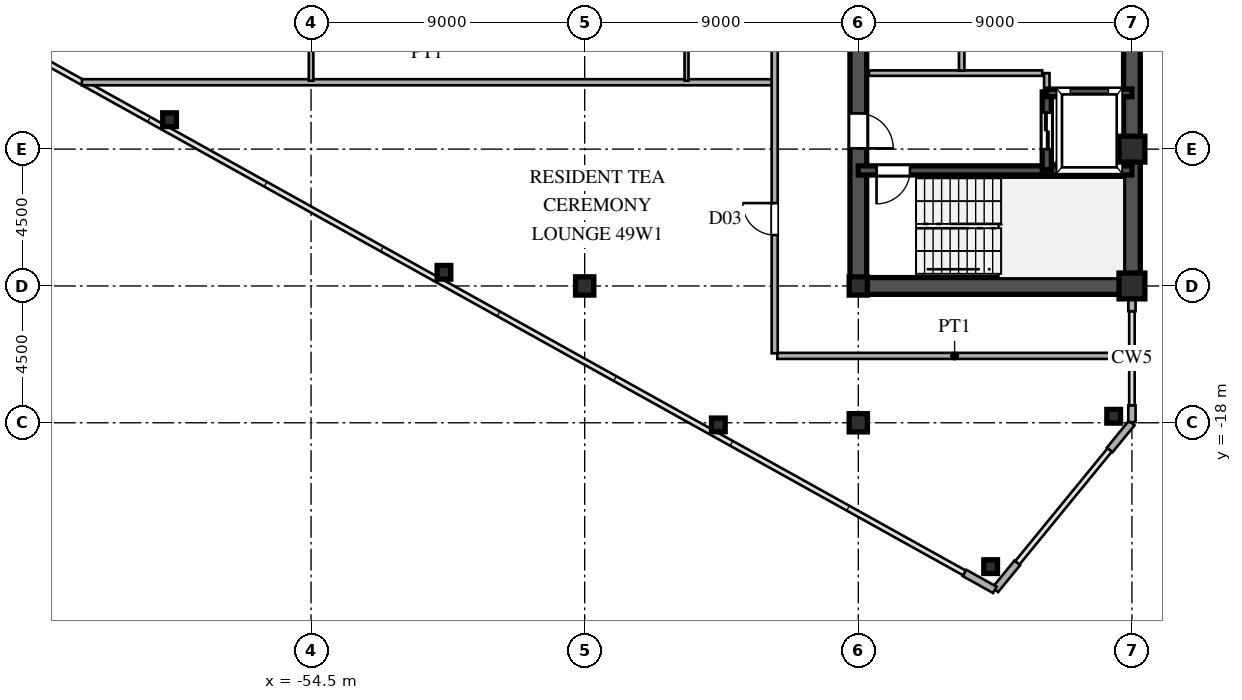
"""IFC4 building model, lengths in metres.
Left out: names, types, materials, properties, quantities, classifications, styles, units other than length and angle.
Written with IfcOpenShell. Run it as: python <this file> out.ifc"""

import sys

from ifc_helpers import new_model, si_unit, direction, frame, frame_2d, origin, origin_2d, place, context, subcontext, project, spatial, rectangle, hollow_rectangle, i_section, extrude, source, transform, mapped, element, fill, save


model = new_model("IFC4")
c1 = context("Model", 3, precision=1e-05, world=origin(), true_north=direction((0.0, 1.0)))
c2 = subcontext(c1, "Body", "Model", "MODEL_VIEW")
j1 = project(units=[si_unit("LENGTHUNIT", "METRE"), si_unit("PLANEANGLEUNIT", "RADIAN")], contexts=[c1])
p1 = place(None, origin())
s1 = spatial("IfcSite", under=j1, at=p1, CompositionType="ELEMENT")
p2 = place(p1, origin())
s2 = spatial("IfcBuilding", under=s1, at=p2, CompositionType="ELEMENT")
p3 = place(p2, frame((0.0, 0.0, 185.1)))
s3 = spatial("IfcBuildingStorey", under=s2, at=p3, CompositionType="ELEMENT", Elevation=185.1)
m1 = source(origin(), c2, "Body", "SweptSolid", [
    extrude(hollow_rectangle(XDim=0.85, YDim=0.85, WallThickness=0.036, at=origin_2d()), origin(), (0.0, 0.0, 1.0), 3.6),
])
for number, where, z_axis, x_axis in (
    (1, (-27.5, -13.5, 0.0), (0.0, 0.0, 1.0), (1.0, 0.0, 0.0)),
    (2, (-27.5, -9.0, 0.0), (0.0, 0.0, 1.0), (1.0, 0.0, 0.0)),
):
    element("IfcColumn", number, at=place(p3, frame(where, z_axis=z_axis, x_axis=x_axis)), inside=s3, PredefinedType="COLUMN", context=c2, shape_type="MappedRepresentation", body=[
        mapped(m1, transform((0.0, 0.0, 0.0), scale=1.0)),
    ])
m2 = source(origin(), c2, "Body", "SweptSolid", [
    extrude(i_section(OverallWidth=0.6, OverallDepth=0.6, WebThickness=0.025, FlangeThickness=0.04, at=origin_2d()), origin(), (0.0, 0.0, 1.0), 3.6),
])
for number, where, z_axis, x_axis in (
    (3, (-36.5, -18.0, 0.0), (0.0, 0.0, 1.0), (1.0, 0.0, 0.0)),
    (4, (-36.5, -13.5, 0.0), (0.0, 0.0, 1.0), (1.0, 0.0, 0.0)),
    (5, (-45.5, -13.5, 0.0), (0.0, 0.0, 1.0), (1.0, 0.0, 0.0)),
):
    element("IfcColumn", number, at=place(p3, frame(where, z_axis=z_axis, x_axis=x_axis)), inside=s3, PredefinedType="COLUMN", context=c2, shape_type="MappedRepresentation", body=[
        mapped(m2, transform((0.0, 0.0, 0.0), scale=1.0)),
    ])
m3 = source(origin(), c2, "Body", "SweptSolid", [
    extrude(hollow_rectangle(XDim=0.45, YDim=0.45, WallThickness=0.018, at=origin_2d()), origin(), (0.0, 0.0, 1.0), 3.6),
])
for number, where, z_axis, x_axis in (
    (6, (-28.1, -17.786, 0.0), (0.0, 0.0, 1.0), (1.0, 0.0, 0.0)),
    (7, (-32.147, -22.732, 0.0), (0.0, 0.0, 1.0), (1.0, 0.0, 0.0)),
    (8, (-41.104, -18.071, 0.0), (0.0, 0.0, 1.0), (1.0, 0.0, 0.0)),
    (9, (-50.129, -13.051, 0.0), (0.0, 0.0, 1.0), (1.0, 0.0, 0.0)),
    (10, (-59.155, -8.031, 0.0), (0.0, 0.0, 1.0), (1.0, 0.0, 0.0)),
):
    element("IfcColumn", number, at=place(p3, frame(where, z_axis=z_axis, x_axis=x_axis)), inside=s3, PredefinedType="COLUMN", context=c2, shape_type="MappedRepresentation", body=[
        mapped(m3, transform((0.0, 0.0, 0.0), scale=1.0)),
    ])
p4 = place(p3, frame((-27.5, -17.98, 0.0), z_axis=(0.0, 0.0, 1.0), x_axis=(0.0, 1.0, 0.0)))
e11 = element("IfcWall", 11, at=p4, inside=s3, PredefinedType="SOLIDWALL", context=c2, shape_type="SweptSolid", body=[
    extrude(rectangle(XDim=0.55, YDim=0.24, at=frame_2d((0.275, 0.0))), origin(), (0.0, 0.0, 1.0), 3.38),
])
p5 = place(p3, frame((-27.5, -14.33, 0.0), z_axis=(0.0, 0.0, 1.0), x_axis=(0.0, 1.0, 0.0)))
e12 = element("IfcWall", 12, at=p5, inside=s3, PredefinedType="SOLIDWALL", context=c2, shape_type="SweptSolid", body=[
    extrude(rectangle(XDim=0.55, YDim=0.24, at=frame_2d((0.275, 0.0))), origin(), (0.0, 0.0, 1.0), 2.88),
])
p6 = place(p3, frame((-33.005, -22.941, 0.0), z_axis=(0.0, 0.0, 1.0), x_axis=(0.87385402111, -0.486188389196, 0.0)))
e13 = element("IfcWall", 13, at=p6, inside=s3, PredefinedType="SOLIDWALL", context=c2, shape_type="SweptSolid", body=[
    extrude(rectangle(XDim=1.14, YDim=0.24, at=frame_2d((0.57, 0.0))), origin(), (0.0, 0.0, 1.0), 3.38),
])
for number, where, z_axis, x_axis in (
    (14, (-31.994, -23.492, 0.0), (0.0, 0.0, 1.0), (0.633, 0.774, 0.0)),
    (15, (-28.228, -18.89, 0.0), (0.0, 0.0, 1.0), (0.633, 0.774, 0.0)),
):
    element("IfcWall", number, at=place(p3, frame(where, z_axis=z_axis, x_axis=x_axis)), inside=s3, PredefinedType="SOLIDWALL", context=c2, shape_type="SweptSolid", body=[
        extrude(rectangle(XDim=1.14, YDim=0.24, at=frame_2d((0.57, 0.0))), origin(), (0.0, 0.0, 1.0), 3.38),
    ])
p7 = place(p3, frame((-27.5, -13.5, 0.0), z_axis=(0.0, 0.0, 1.0), x_axis=(0.0, 1.0, 0.0)))
e16 = element("IfcWall", 16, at=p7, inside=s3, PredefinedType="SHEAR", context=c2, shape_type="SweptSolid", body=[
    extrude(rectangle(XDim=12.2, YDim=0.55, at=frame_2d((6.1, 0.0))), origin(), (0.0, 0.0, 1.0), 3.38),
])
p8 = place(p3, frame((-36.5, -13.5, 0.0), z_axis=(0.0, 0.0, 1.0), x_axis=(1.0, 0.0, 0.0)))
e17 = element("IfcWall", 17, at=p8, inside=s3, PredefinedType="SHEAR", context=c2, shape_type="SweptSolid", body=[
    extrude(rectangle(XDim=9.0, YDim=0.55, at=frame_2d((4.5, 0.0))), origin(), (0.0, 0.0, 1.0), 3.38),
])
p9 = place(p3, frame((-36.5, -13.65, 0.0), z_axis=(0.0, 0.0, 1.0), x_axis=(0.0, 1.0, 0.0)))
e18 = element("IfcWall", 18, at=p9, inside=s3, PredefinedType="SHEAR", context=c2, shape_type="SweptSolid", body=[
    extrude(rectangle(XDim=7.15, YDim=0.55, at=frame_2d((3.575, 0.0))), origin(), (0.0, 0.0, 1.0), 3.38),
])
p10 = place(p9, frame((4.675, 0.0, 0.0)))
e19 = element("IfcOpeningElement", 19, at=p10, cuts=e18, PredefinedType="OPENING", context=c2, shape_type="SweptSolid", body=[
    extrude(rectangle(XDim=1.15, YDim=2.2, at=frame_2d((0.575, 1.1))), frame((0.0, 0.285, 0.0), z_axis=(0.0, -1.0, 0.0), x_axis=(1.0, 0.0, 0.0)), (0.0, 0.0, 1.0), 0.57),
])
p11 = place(p3, frame((-36.5, -6.5, 0.0), z_axis=(0.0, 0.0, 1.0), x_axis=(0.0, 1.0, 0.0)))
e20 = element("IfcWall", 20, at=p11, inside=s3, PredefinedType="SHEAR", context=c2, shape_type="SweptSolid", body=[
    extrude(rectangle(XDim=5.2, YDim=0.55, at=frame_2d((2.6, 0.0))), origin(), (0.0, 0.0, 1.0), 3.38),
])
p12 = place(p11, frame((2.125, 0.0, 0.0)))
e21 = element("IfcOpeningElement", 21, at=p12, cuts=e20, PredefinedType="OPENING", context=c2, shape_type="SweptSolid", body=[
    extrude(rectangle(XDim=0.95, YDim=2.15, at=frame_2d((0.475, 1.075))), frame((0.0, 0.285, 0.0), z_axis=(0.0, -1.0, 0.0), x_axis=(1.0, 0.0, 0.0)), (0.0, 0.0, 1.0), 0.57),
])
p13 = place(p3, frame((-36.5, -9.7, 0.0), z_axis=(0.0, 0.0, 1.0), x_axis=(1.0, 0.0, 0.0)))
e22 = element("IfcWall", 22, at=p13, inside=s3, PredefinedType="SHEAR", context=c2, shape_type="SweptSolid", body=[
    extrude(rectangle(XDim=9.0, YDim=0.3, at=frame_2d((4.5, 0.0))), origin(), (0.0, 0.0, 1.0), 3.38),
])
p14 = place(p13, frame((0.6, 0.0, 0.0)))
e23 = element("IfcOpeningElement", 23, at=p14, cuts=e22, PredefinedType="OPENING", context=c2, shape_type="SweptSolid", body=[
    extrude(rectangle(XDim=1.1, YDim=2.2, at=frame_2d((0.55, 1.1))), frame((0.0, 0.16, 0.0), z_axis=(0.0, -1.0, 0.0), x_axis=(1.0, 0.0, 0.0)), (0.0, 0.0, 1.0), 0.32),
])
p15 = place(p3, frame((-30.3, -7.15, 0.0), z_axis=(0.0, 0.0, 1.0), x_axis=(1.0, 0.0, 0.0)))
e24 = element("IfcWall", 24, at=p15, inside=s3, PredefinedType="SHEAR", context=c2, shape_type="SweptSolid", body=[
    extrude(rectangle(XDim=2.8, YDim=0.25, at=frame_2d((1.4, 0.0))), origin(), (0.0, 0.0, 1.0), 3.38),
])
p16 = place(p3, frame((-30.3, -9.68, 0.0), z_axis=(0.0, 0.0, 1.0), x_axis=(0.0, 1.0, 0.0)))
e25 = element("IfcWall", 25, at=p16, inside=s3, PredefinedType="SHEAR", context=c2, shape_type="SweptSolid", body=[
    extrude(rectangle(XDim=2.56, YDim=0.3, at=frame_2d((1.28, 0.0))), origin(), (0.0, 0.0, 1.0), 3.38),
])
p17 = place(p16, frame((0.68, 0.0, 0.0)))
e26 = element("IfcOpeningElement", 26, at=p17, cuts=e25, PredefinedType="OPENING", context=c2, shape_type="SweptSolid", body=[
    extrude(rectangle(XDim=1.2, YDim=2.25, at=frame_2d((0.6, 1.125))), frame((0.0, 0.16, 0.0), z_axis=(0.0, -1.0, 0.0), x_axis=(1.0, 0.0, 0.0)), (0.0, 0.0, 1.0), 0.32),
])
p18 = place(p3, frame((-36.15, -6.5, 0.0), z_axis=(0.0, 0.0, 1.0), x_axis=(1.0, 0.0, 0.0)))
e27 = element("IfcWall", 27, at=p18, inside=s3, PredefinedType="PARTITIONING", context=c2, shape_type="SweptSolid", body=[
    extrude(rectangle(XDim=5.7, YDim=0.18, at=frame_2d((2.85, 0.0))), origin(), (0.0, 0.0, 1.0), 3.38),
])
p19 = place(p3, frame((-30.3, -7.12, 0.0), z_axis=(0.0, 0.0, 1.0), x_axis=(0.0, 1.0, 0.0)))
e28 = element("IfcWall", 28, at=p19, inside=s3, PredefinedType="PARTITIONING", context=c2, shape_type="SweptSolid", body=[
    extrude(rectangle(XDim=0.62, YDim=0.18, at=frame_2d((0.31, 0.0))), origin(), (0.0, 0.0, 1.0), 3.38),
])
p20 = place(p3, frame((-33.1, -6.42, 0.0), z_axis=(0.0, 0.0, 1.0), x_axis=(0.0, 1.0, 0.0)))
e29 = element("IfcWall", 29, at=p20, inside=s3, PredefinedType="PARTITIONING", context=c2, shape_type="SweptSolid", body=[
    extrude(rectangle(XDim=5.04, YDim=0.18, at=frame_2d((2.52, 0.0))), origin(), (0.0, 0.0, 1.0), 3.38),
])
p21 = place(p3, frame((-39.165, -15.8, 0.0), z_axis=(0.0, 0.0, 1.0), x_axis=(1.0, 0.0, 0.0)))
e30 = element("IfcWall", 30, at=p21, inside=s3, PredefinedType="PARTITIONING", context=c2, shape_type="SweptSolid", body=[
    extrude(rectangle(XDim=11.665, YDim=0.2, at=frame_2d((5.833, 0.0))), origin(), (0.0, 0.0, 1.0), 3.38),
])
p22 = place(p3, frame((-62.037, -6.8, 0.0), z_axis=(0.0, 0.0, 1.0), x_axis=(1.0, 0.0, 0.0)))
e31 = element("IfcWall", 31, at=p22, inside=s3, PredefinedType="PARTITIONING", context=c2, shape_type="SweptSolid", body=[
    extrude(rectangle(XDim=22.707, YDim=0.2, at=frame_2d((11.354, 0.0))), origin(), (0.0, 0.0, 1.0), 3.38),
])
p23 = place(p3, frame((-54.5, -6.75, 0.0), z_axis=(0.0, 0.0, 1.0), x_axis=(0.0, 1.0, 0.0)))
e32 = element("IfcWall", 32, at=p23, inside=s3, PredefinedType="PARTITIONING", context=c2, shape_type="SweptSolid", body=[
    extrude(rectangle(XDim=13.5, YDim=0.15, at=frame_2d((6.75, 0.0))), origin(), (0.0, 0.0, 1.0), 2.78),
])
p24 = place(p23, frame((6.275, 0.0, 0.0)))
e33 = element("IfcOpeningElement", 33, at=p24, cuts=e32, PredefinedType="OPENING", context=c2, shape_type="SweptSolid", body=[
    extrude(rectangle(XDim=0.95, YDim=2.15, at=frame_2d((0.475, 1.075))), frame((0.0, 0.085, 0.0), z_axis=(0.0, -1.0, 0.0), x_axis=(1.0, 0.0, 0.0)), (0.0, 0.0, 1.0), 0.17),
])
p25 = place(p3, frame((-42.15, -6.75, 0.0), z_axis=(0.0, 0.0, 1.0), x_axis=(0.0, 1.0, 0.0)))
e34 = element("IfcWall", 34, at=p25, inside=s3, PredefinedType="PARTITIONING", context=c2, shape_type="SweptSolid", body=[
    extrude(rectangle(XDim=8.967, YDim=0.13, at=frame_2d((4.483, 0.0))), origin(), (0.0, 0.0, 1.0), 3.38),
])
p26 = place(p25, frame((6.275, 0.0, 0.0)))
e35 = element("IfcOpeningElement", 35, at=p26, cuts=e34, PredefinedType="OPENING", context=c2, shape_type="SweptSolid", body=[
    extrude(rectangle(XDim=0.95, YDim=2.15, at=frame_2d((0.475, 1.075))), frame((0.0, 0.075, 0.0), z_axis=(0.0, -1.0, 0.0), x_axis=(1.0, 0.0, 0.0)), (0.0, 0.0, 1.0), 0.15),
])
p27 = place(p3, frame((-39.25, -15.715, 0.0), z_axis=(0.0, 0.0, 1.0), x_axis=(0.0, 1.0, 0.0)))
e36 = element("IfcWall", 36, at=p27, inside=s3, PredefinedType="PARTITIONING", context=c2, shape_type="SweptSolid", body=[
    extrude(rectangle(XDim=31.43, YDim=0.2, at=frame_2d((15.715, 0.0))), origin(), (0.0, 0.0, 1.0), 3.38),
])
p28 = place(p27, frame((3.89, 0.0, 0.0)))
e37 = element("IfcOpeningElement", 37, at=p28, cuts=e36, PredefinedType="OPENING", context=c2, shape_type="SweptSolid", body=[
    extrude(rectangle(XDim=1.05, YDim=2.25, at=frame_2d((0.525, 1.125))), frame((0.0, 0.11, 0.0), z_axis=(0.0, -1.0, 0.0), x_axis=(1.0, 0.0, 0.0)), (0.0, 0.0, 1.0), 0.22),
])
p29 = place(p27, frame((14.986, 0.0, 0.0)))
e38 = element("IfcOpeningElement", 38, at=p29, cuts=e36, PredefinedType="OPENING", context=c2, shape_type="SweptSolid", body=[
    extrude(rectangle(XDim=1.05, YDim=2.25, at=frame_2d((0.525, 1.125))), frame((0.0, 0.11, 0.0), z_axis=(0.0, -1.0, 0.0), x_axis=(1.0, 0.0, 0.0)), (0.0, 0.0, 1.0), 0.22),
])
p30 = place(p27, frame((26.49, 0.0, 0.0)))
e39 = element("IfcOpeningElement", 39, at=p30, cuts=e36, PredefinedType="OPENING", context=c2, shape_type="SweptSolid", body=[
    extrude(rectangle(XDim=1.05, YDim=2.25, at=frame_2d((0.525, 1.125))), frame((0.0, 0.11, 0.0), z_axis=(0.0, -1.0, 0.0), x_axis=(1.0, 0.0, 0.0)), (0.0, 0.0, 1.0), 0.22),
])
m4 = source(origin(), c2, "Body", "SweptSolid", [
    extrude(rectangle(XDim=1.15, YDim=2.2, at=frame_2d((0.575, 1.1))), frame((0.0, 0.025, 0.0), z_axis=(0.0, -1.0, 0.0), x_axis=(1.0, 0.0, 0.0)), (0.0, 0.0, 1.0), 0.05),
])
p31 = place(p10, frame((1.15, 0.0, 0.0), z_axis=(0.0, 0.0, 1.0), x_axis=(-1.0, 0.0, 0.0)))
e40 = element("IfcDoor", 40, at=p31, inside=s3, OperationType="SINGLE_SWING_LEFT", PredefinedType="DOOR", context=c2, shape_type="MappedRepresentation", body=[
    mapped(m4, transform((0.0, 0.0, 0.0), scale=1.0)),
])
fill(e19, e40)
m5 = source(origin(), c2, "Body", "SweptSolid", [
    extrude(rectangle(XDim=1.1, YDim=2.2, at=frame_2d((0.55, 1.1))), frame((0.0, 0.025, 0.0), z_axis=(0.0, -1.0, 0.0), x_axis=(1.0, 0.0, 0.0)), (0.0, 0.0, 1.0), 0.05),
])
p32 = place(p14, frame((1.1, 0.0, 0.0), z_axis=(0.0, 0.0, 1.0), x_axis=(-1.0, 0.0, 0.0)))
e41 = element("IfcDoor", 41, at=p32, inside=s3, OperationType="SINGLE_SWING_LEFT", PredefinedType="DOOR", context=c2, shape_type="MappedRepresentation", body=[
    mapped(m5, transform((0.0, 0.0, 0.0), scale=1.0)),
])
fill(e23, e41)
m6 = source(origin(), c2, "Body", "SweptSolid", [
    extrude(rectangle(XDim=1.2, YDim=2.25, at=frame_2d((0.6, 1.125))), frame((0.0, 0.025, 0.0), z_axis=(0.0, -1.0, 0.0), x_axis=(1.0, 0.0, 0.0)), (0.0, 0.0, 1.0), 0.05),
])
p33 = place(p17, origin())
e42 = element("IfcDoor", 42, at=p33, inside=s3, OperationType="DOUBLE_DOOR_SLIDING", PredefinedType="DOOR", context=c2, shape_type="MappedRepresentation", body=[
    mapped(m6, transform((0.0, 0.0, 0.0), scale=1.0)),
])
fill(e26, e42)
m7 = source(origin(), c2, "Body", "SweptSolid", [
    extrude(rectangle(XDim=1.05, YDim=2.25, at=frame_2d((0.525, 1.125))), frame((0.0, 0.025, 0.0), z_axis=(0.0, -1.0, 0.0), x_axis=(1.0, 0.0, 0.0)), (0.0, 0.0, 1.0), 0.05),
])
p34 = place(p28, origin())
e43 = element("IfcDoor", 43, at=p34, inside=s3, OperationType="SINGLE_SWING_RIGHT", PredefinedType="DOOR", context=c2, shape_type="MappedRepresentation", body=[
    mapped(m7, transform((0.0, 0.0, 0.0), scale=1.0)),
])
fill(e37, e43)
save(model, sys.argv[1])
